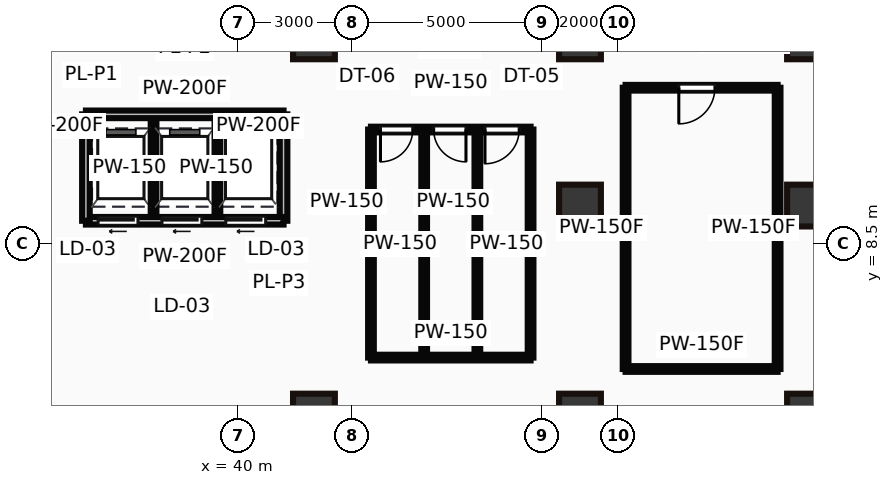
"""IFC4 building model, lengths in metres.
Left out: names, types, materials, properties, quantities, classifications, styles, units other than length and angle.
Written with IfcOpenShell. Run it as: python <this file> out.ifc"""

import sys

from ifc_helpers import new_model, si_unit, direction, frame, frame_2d, origin, origin_2d, place, context, subcontext, project, spatial, rectangle, hollow_rectangle, extrude, source, transform, mapped, element, fill, save


model = new_model("IFC4")
c1 = context("Model", 3, precision=1e-05, world=origin(), true_north=direction((0.0, 1.0)))
c2 = subcontext(c1, "Body", "Model", "MODEL_VIEW")
j1 = project(units=[si_unit("LENGTHUNIT", "METRE"), si_unit("PLANEANGLEUNIT", "RADIAN")], contexts=[c1])
p1 = place(None, origin())
s1 = spatial("IfcSite", under=j1, at=p1, CompositionType="ELEMENT")
p2 = place(p1, origin())
s2 = spatial("IfcBuilding", under=s1, at=p2, CompositionType="ELEMENT")
p3 = place(p2, frame((0.0, 0.0, 11.0)))
s3 = spatial("IfcBuildingStorey", under=s2, at=p3, CompositionType="ELEMENT", Elevation=11.0)
m1 = source(origin(), c2, "Body", "SweptSolid", [
    extrude(hollow_rectangle(XDim=1.1, YDim=1.3, WallThickness=0.055, at=origin_2d()), origin(), (0.0, 0.0, 1.0), 5.0),
])
for number, where, z_axis, x_axis in (
    (1, (42.0, 14.0, 0.0), (0.0, 0.0, 1.0), (1.0, 0.0, 0.0)),
    (2, (49.0, 14.0, 0.0), (0.0, 0.0, 1.0), (1.0, 0.0, 0.0)),
    (3, (55.0, 14.0, 0.0), (0.0, 0.0, 1.0), (1.0, 0.0, 0.0)),
):
    element("IfcColumn", number, at=place(p3, frame(where, z_axis=z_axis, x_axis=x_axis)), inside=s3, PredefinedType="PILASTER", context=c2, shape_type="MappedRepresentation", body=[
        mapped(m1, transform((0.0, 0.0, 0.0))),
    ])
m2 = source(origin(), c2, "Body", "SweptSolid", [
    extrude(hollow_rectangle(XDim=1.1, YDim=1.1, WallThickness=0.05, at=origin_2d()), origin(), (0.0, 0.0, 1.0), 5.0),
])
for number, where, z_axis, x_axis in (
    (4, (49.0, 9.5, 0.0), (0.0, 0.0, 1.0), (1.0, 0.0, 0.0)),
    (5, (55.0, 9.5, 0.0), (0.0, 0.0, 1.0), (1.0, 0.0, 0.0)),
    (6, (42.0, 4.0, 0.0), (0.0, 0.0, 1.0), (1.0, 0.0, 0.0)),
    (7, (49.0, 4.0, 0.0), (0.0, 0.0, 1.0), (1.0, 0.0, 0.0)),
    (8, (55.0, 4.0, 0.0), (0.0, 0.0, 1.0), (1.0, 0.0, 0.0)),
):
    element("IfcColumn", number, at=place(p3, frame(where, z_axis=z_axis, x_axis=x_axis)), inside=s3, PredefinedType="PILASTER", context=c2, shape_type="MappedRepresentation", body=[
        mapped(m2, transform((0.0, 0.0, 0.0))),
    ])
m3 = source(origin(), c2, "Body", "SweptSolid", [
    extrude(rectangle(XDim=5.2, YDim=0.2, at=frame_2d((2.6, 0.0))), origin(), (0.0, 0.0, 1.0), 4.7),
])
p4 = place(p3, frame((36.0, 9.1, 0.0), z_axis=(0.0, 0.0, 1.0), x_axis=(1.0, 0.0, 0.0)))
e9 = element("IfcWall", 9, at=p4, inside=s3, PredefinedType="PARTITIONING", context=c2, shape_type="MappedRepresentation", body=[
    mapped(m3, transform((0.0, 0.0, 0.0))),
])
p5 = place(p4, frame((0.32, 0.0, 0.0)))
e10 = element("IfcOpeningElement", 10, at=p5, cuts=e9, PredefinedType="OPENING", context=c2, shape_type="SweptSolid", body=[
    extrude(rectangle(XDim=1.05, YDim=2.15, at=frame_2d((0.525, 1.075))), frame((0.0, 0.11, 0.0), z_axis=(0.0, -1.0, 0.0), x_axis=(1.0, 0.0, 0.0)), (0.0, 0.0, 1.0), 0.22),
])
p6 = place(p4, frame((2.0, 0.0, 0.0)))
e11 = element("IfcOpeningElement", 11, at=p6, cuts=e9, PredefinedType="OPENING", context=c2, shape_type="SweptSolid", body=[
    extrude(rectangle(XDim=1.05, YDim=2.15, at=frame_2d((0.525, 1.075))), frame((0.0, 0.11, 0.0), z_axis=(0.0, -1.0, 0.0), x_axis=(1.0, 0.0, 0.0)), (0.0, 0.0, 1.0), 0.22),
])
p7 = place(p4, frame((3.68, 0.0, 0.0)))
e12 = element("IfcOpeningElement", 12, at=p7, cuts=e9, PredefinedType="OPENING", context=c2, shape_type="SweptSolid", body=[
    extrude(rectangle(XDim=1.05, YDim=2.15, at=frame_2d((0.525, 1.075))), frame((0.0, 0.11, 0.0), z_axis=(0.0, -1.0, 0.0), x_axis=(1.0, 0.0, 0.0)), (0.0, 0.0, 1.0), 0.22),
])
p8 = place(p3, frame((36.0, 11.9, 0.0), z_axis=(0.0, 0.0, 1.0), x_axis=(1.0, 0.0, 0.0)))
e13 = element("IfcWall", 13, at=p8, inside=s3, PredefinedType="PARTITIONING", context=c2, shape_type="MappedRepresentation", body=[
    mapped(m3, transform((0.0, 0.0, 0.0))),
])
m4 = source(origin(), c2, "Body", "SweptSolid", [
    extrude(rectangle(XDim=2.8, YDim=0.2, at=frame_2d((1.4, 0.0))), origin(), (0.0, 0.0, 1.0), 4.7),
])
for number, where, z_axis, x_axis in (
    (14, (36.0, 9.1, 0.0), (0.0, 0.0, 1.0), (0.0, 1.0, 0.0)),
    (15, (41.2, 9.1, 0.0), (0.0, 0.0, 1.0), (0.0, 1.0, 0.0)),
):
    element("IfcWall", number, at=place(p3, frame(where, z_axis=z_axis, x_axis=x_axis)), inside=s3, PredefinedType="PARTITIONING", context=c2, shape_type="MappedRepresentation", body=[
        mapped(m4, transform((0.0, 0.0, 0.0))),
    ])
m5 = source(origin(), c2, "Body", "SweptSolid", [
    extrude(rectangle(XDim=2.7, YDim=0.15, at=frame_2d((1.35, 0.0))), origin(), (0.0, 0.0, 1.0), 4.7),
])
for number, where, z_axis, x_axis in (
    (16, (37.78, 9.15, 0.0), (0.0, 0.0, 1.0), (0.0, 1.0, 0.0)),
    (17, (39.46, 9.15, 0.0), (0.0, 0.0, 1.0), (0.0, 1.0, 0.0)),
):
    element("IfcWall", number, at=place(p3, frame(where, z_axis=z_axis, x_axis=x_axis)), inside=s3, PredefinedType="PARTITIONING", context=c2, shape_type="MappedRepresentation", body=[
        mapped(m5, transform((0.0, 0.0, 0.0))),
    ])
m6 = source(origin(), c2, "Body", "SweptSolid", [
    extrude(rectangle(XDim=4.2, YDim=0.15, at=frame_2d((2.1, 0.0))), origin(), (0.0, 0.0, 1.0), 4.7),
])
p9 = place(p3, frame((43.5, 11.5, 0.0), z_axis=(0.0, 0.0, 1.0), x_axis=(1.0, 0.0, 0.0)))
e18 = element("IfcWall", 18, at=p9, inside=s3, PredefinedType="PARTITIONING", context=c2, shape_type="MappedRepresentation", body=[
    mapped(m6, transform((0.0, 0.0, 0.0))),
])
p10 = place(p9, frame((0.25, 0.0, 0.0)))
e19 = element("IfcOpeningElement", 19, at=p10, cuts=e18, PredefinedType="OPENING", context=c2, shape_type="SweptSolid", body=[
    extrude(rectangle(XDim=0.85, YDim=2.1, at=frame_2d((0.425, 1.05))), frame((0.0, 0.085, 0.0), z_axis=(0.0, -1.0, 0.0), x_axis=(1.0, 0.0, 0.0)), (0.0, 0.0, 1.0), 0.17),
])
p11 = place(p9, frame((1.65, 0.0, 0.0)))
e20 = element("IfcOpeningElement", 20, at=p11, cuts=e18, PredefinedType="OPENING", context=c2, shape_type="SweptSolid", body=[
    extrude(rectangle(XDim=0.85, YDim=2.1, at=frame_2d((0.425, 1.05))), frame((0.0, 0.085, 0.0), z_axis=(0.0, -1.0, 0.0), x_axis=(1.0, 0.0, 0.0)), (0.0, 0.0, 1.0), 0.17),
])
p12 = place(p9, frame((3.0, 0.0, 0.0)))
e21 = element("IfcOpeningElement", 21, at=p12, cuts=e18, PredefinedType="OPENING", context=c2, shape_type="SweptSolid", body=[
    extrude(rectangle(XDim=0.9, YDim=2.1, at=frame_2d((0.45, 1.05))), frame((0.0, 0.085, 0.0), z_axis=(0.0, -1.0, 0.0), x_axis=(1.0, 0.0, 0.0)), (0.0, 0.0, 1.0), 0.17),
])
p13 = place(p3, frame((43.5, 5.5, 0.0), z_axis=(0.0, 0.0, 1.0), x_axis=(1.0, 0.0, 0.0)))
e22 = element("IfcWall", 22, at=p13, inside=s3, PredefinedType="PARTITIONING", context=c2, shape_type="MappedRepresentation", body=[
    mapped(m6, transform((0.0, 0.0, 0.0))),
])
m7 = source(origin(), c2, "Body", "SweptSolid", [
    extrude(rectangle(XDim=6.0, YDim=0.15, at=frame_2d((3.0, 0.0))), origin(), (0.0, 0.0, 1.0), 4.7),
])
for number, where, z_axis, x_axis in (
    (23, (43.5, 5.5, 0.0), (0.0, 0.0, 1.0), (0.0, 1.0, 0.0)),
    (24, (47.7, 5.5, 0.0), (0.0, 0.0, 1.0), (0.0, 1.0, 0.0)),
    (25, (44.9, 5.5, 0.0), (0.0, 0.0, 1.0), (0.0, 1.0, 0.0)),
    (26, (46.3, 5.5, 0.0), (0.0, 0.0, 1.0), (0.0, 1.0, 0.0)),
):
    element("IfcWall", number, at=place(p3, frame(where, z_axis=z_axis, x_axis=x_axis)), inside=s3, PredefinedType="PARTITIONING", context=c2, shape_type="MappedRepresentation", body=[
        mapped(m7, transform((0.0, 0.0, 0.0))),
    ])
m8 = source(origin(), c2, "Body", "SweptSolid", [
    extrude(rectangle(XDim=4.0, YDim=0.15, at=frame_2d((2.0, 0.0))), origin(), (0.0, 0.0, 1.0), 4.7),
])
p14 = place(p3, frame((50.2, 12.6, 0.0), z_axis=(0.0, 0.0, 1.0), x_axis=(1.0, 0.0, 0.0)))
e27 = element("IfcWall", 27, at=p14, inside=s3, PredefinedType="PARTITIONING", context=c2, shape_type="MappedRepresentation", body=[
    mapped(m8, transform((0.0, 0.0, 0.0))),
])
p15 = place(p14, frame((1.4, 0.0, 0.0)))
e28 = element("IfcOpeningElement", 28, at=p15, cuts=e27, PredefinedType="OPENING", context=c2, shape_type="SweptSolid", body=[
    extrude(rectangle(XDim=0.95, YDim=2.15, at=frame_2d((0.475, 1.075))), frame((0.0, 0.085, 0.0), z_axis=(0.0, -1.0, 0.0), x_axis=(1.0, 0.0, 0.0)), (0.0, 0.0, 1.0), 0.17),
])
p16 = place(p3, frame((50.2, 5.2, 0.0), z_axis=(0.0, 0.0, 1.0), x_axis=(1.0, 0.0, 0.0)))
e29 = element("IfcWall", 29, at=p16, inside=s3, PredefinedType="PARTITIONING", context=c2, shape_type="MappedRepresentation", body=[
    mapped(m8, transform((0.0, 0.0, 0.0))),
])
m9 = source(origin(), c2, "Body", "SweptSolid", [
    extrude(rectangle(XDim=7.4, YDim=0.15, at=frame_2d((3.7, 0.0))), origin(), (0.0, 0.0, 1.0), 4.7),
])
for number, where, z_axis, x_axis in (
    (30, (50.2, 5.2, 0.0), (0.0, 0.0, 1.0), (0.0, 1.0, 0.0)),
    (31, (54.2, 5.2, 0.0), (0.0, 0.0, 1.0), (0.0, 1.0, 0.0)),
):
    element("IfcWall", number, at=place(p3, frame(where, z_axis=z_axis, x_axis=x_axis)), inside=s3, PredefinedType="PARTITIONING", context=c2, shape_type="MappedRepresentation", body=[
        mapped(m9, transform((0.0, 0.0, 0.0))),
    ])
m10 = source(origin(), c2, "Body", "SweptSolid", [
    extrude(rectangle(XDim=1.05, YDim=2.15, at=frame_2d((0.525, 1.075))), frame((0.0, 0.025, 0.0), z_axis=(0.0, -1.0, 0.0), x_axis=(1.0, 0.0, 0.0)), (0.0, 0.0, 1.0), 0.05),
])
p17 = place(p5, frame((1.05, 0.0, 0.0), z_axis=(0.0, 0.0, 1.0), x_axis=(-1.0, 0.0, 0.0)))
e32 = element("IfcDoor", 32, at=p17, inside=s3, OperationType="SLIDING_TO_LEFT", PredefinedType="DOOR", context=c2, shape_type="MappedRepresentation", body=[
    mapped(m10, transform((0.0, 0.0, 0.0))),
])
fill(e10, e32)
p18 = place(p6, frame((1.05, 0.0, 0.0), z_axis=(0.0, 0.0, 1.0), x_axis=(-1.0, 0.0, 0.0)))
e33 = element("IfcDoor", 33, at=p18, inside=s3, OperationType="SLIDING_TO_LEFT", PredefinedType="DOOR", context=c2, shape_type="MappedRepresentation", body=[
    mapped(m10, transform((0.0, 0.0, 0.0))),
])
fill(e11, e33)
p19 = place(p7, frame((1.05, 0.0, 0.0), z_axis=(0.0, 0.0, 1.0), x_axis=(-1.0, 0.0, 0.0)))
e34 = element("IfcDoor", 34, at=p19, inside=s3, OperationType="SLIDING_TO_LEFT", PredefinedType="DOOR", context=c2, shape_type="MappedRepresentation", body=[
    mapped(m10, transform((0.0, 0.0, 0.0))),
])
fill(e12, e34)
m11 = source(origin(), c2, "Body", "SweptSolid", [
    extrude(rectangle(XDim=0.85, YDim=2.1, at=frame_2d((0.425, 1.05))), frame((0.0, 0.025, 0.0), z_axis=(0.0, -1.0, 0.0), x_axis=(1.0, 0.0, 0.0)), (0.0, 0.0, 1.0), 0.05),
])
p20 = place(p10, frame((0.85, 0.0, 0.0), z_axis=(0.0, 0.0, 1.0), x_axis=(-1.0, 0.0, 0.0)))
e35 = element("IfcDoor", 35, at=p20, inside=s3, OperationType="SINGLE_SWING_LEFT", PredefinedType="DOOR", context=c2, shape_type="MappedRepresentation", body=[
    mapped(m11, transform((0.0, 0.0, 0.0))),
])
fill(e19, e35)
p21 = place(p11, frame((0.85, 0.0, 0.0), z_axis=(0.0, 0.0, 1.0), x_axis=(-1.0, 0.0, 0.0)))
e36 = element("IfcDoor", 36, at=p21, inside=s3, OperationType="SINGLE_SWING_RIGHT", PredefinedType="DOOR", context=c2, shape_type="MappedRepresentation", body=[
    mapped(m11, transform((0.0, 0.0, 0.0))),
])
fill(e20, e36)
m12 = source(origin(), c2, "Body", "SweptSolid", [
    extrude(rectangle(XDim=0.9, YDim=2.1, at=frame_2d((0.45, 1.05))), frame((0.0, 0.025, 0.0), z_axis=(0.0, -1.0, 0.0), x_axis=(1.0, 0.0, 0.0)), (0.0, 0.0, 1.0), 0.05),
])
p22 = place(p12, frame((0.9, 0.0, 0.0), z_axis=(0.0, 0.0, 1.0), x_axis=(-1.0, 0.0, 0.0)))
e37 = element("IfcDoor", 37, at=p22, inside=s3, OperationType="SINGLE_SWING_LEFT", PredefinedType="DOOR", context=c2, shape_type="MappedRepresentation", body=[
    mapped(m12, transform((0.0, 0.0, 0.0))),
])
fill(e21, e37)
m13 = source(origin(), c2, "Body", "SweptSolid", [
    extrude(rectangle(XDim=0.95, YDim=2.15, at=frame_2d((0.475, 1.075))), frame((0.0, 0.025, 0.0), z_axis=(0.0, -1.0, 0.0), x_axis=(1.0, 0.0, 0.0)), (0.0, 0.0, 1.0), 0.05),
])
p23 = place(p15, frame((0.95, 0.0, 0.0), z_axis=(0.0, 0.0, 1.0), x_axis=(-1.0, 0.0, 0.0)))
e38 = element("IfcDoor", 38, at=p23, inside=s3, OperationType="SINGLE_SWING_LEFT", PredefinedType="DOOR", context=c2, shape_type="MappedRepresentation", body=[
    mapped(m13, transform((0.0, 0.0, 0.0))),
])
fill(e28, e38)
save(model, sys.argv[1])
